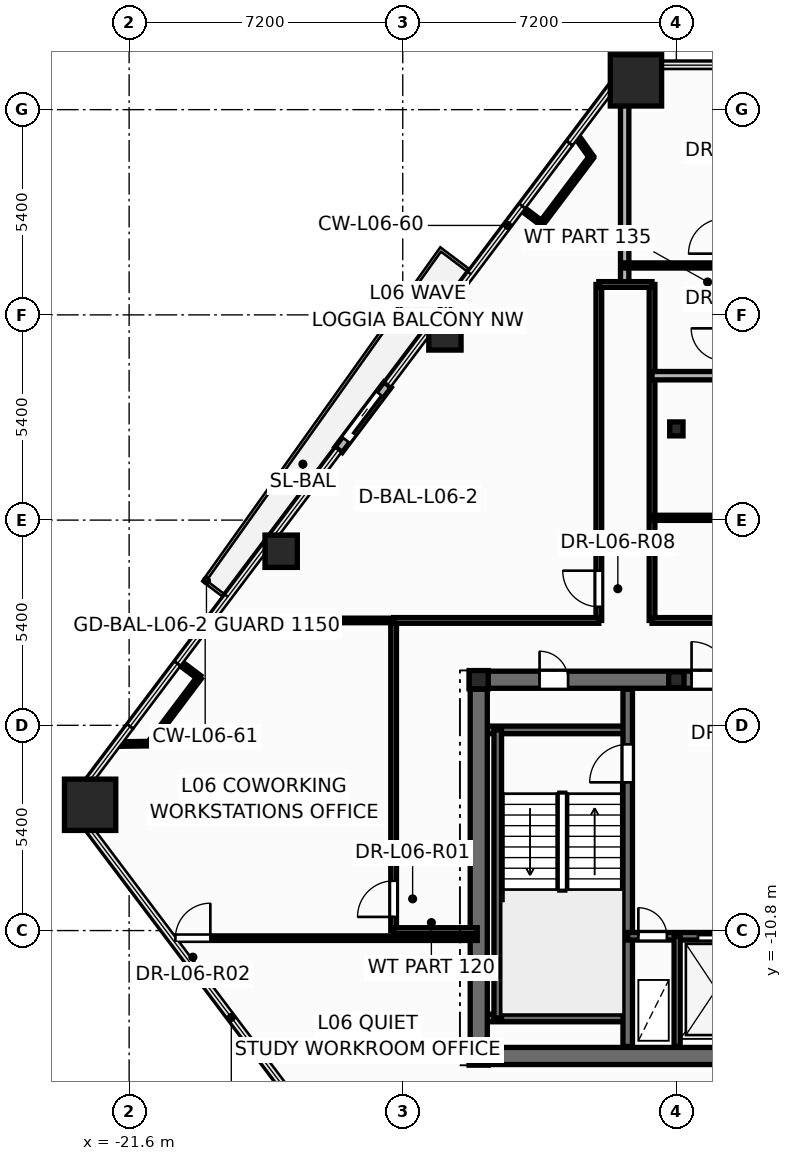
"""IFC4 building model, lengths in metres.
Left out: names, types, materials, properties, quantities, classifications, styles, units other than length and angle.
Written with IfcOpenShell. Run it as: python <this file> out.ifc"""

import sys

from ifc_helpers import new_model, si_unit, direction, frame, frame_2d, origin, origin_2d, place, context, subcontext, project, spatial, rectangle, hollow_rectangle, hollow_circle, i_section, extrude, element, fill, save


model = new_model("IFC4")
c1 = context("Model", 3, precision=1e-05, world=origin(), true_north=direction((0.0, 1.0)))
c2 = subcontext(c1, "Body", "Model", "MODEL_VIEW")
j1 = project(units=[si_unit("LENGTHUNIT", "METRE"), si_unit("PLANEANGLEUNIT", "RADIAN")], contexts=[c1])
p1 = place(None, origin())
s1 = spatial("IfcSite", under=j1, at=p1, CompositionType="ELEMENT")
p2 = place(p1, origin())
s2 = spatial("IfcBuilding", under=s1, at=p2, CompositionType="ELEMENT")
p3 = place(p2, frame((0.0, 0.0, 27.9)))
s3 = spatial("IfcBuildingStorey", under=s2, at=p3, CompositionType="ELEMENT", Elevation=27.9)
for number, where, z_axis, x_axis in (
    (1, (-22.626, -7.49, 0.0), (0.0, 0.0, 1.0), (1.0, 0.0, 0.0)),
    (2, (-8.263, 11.57, 0.0), (0.0, 0.0, 1.0), (1.0, 0.0, 0.0)),
):
    element("IfcColumn", number, at=place(p3, frame(where, z_axis=z_axis, x_axis=x_axis)), inside=s3, PredefinedType="COLUMN", context=c2, shape_type="SweptSolid", body=[
        extrude(hollow_rectangle(XDim=1.35, YDim=1.35, WallThickness=0.065, at=origin_2d()), origin(), (0.0, 0.0, 1.0), 3.6),
    ])
for number, where, z_axis, x_axis in (
    (3, (-13.29, 4.899, 0.0), (0.0, 0.0, 1.0), (1.0, 0.0, 0.0)),
    (4, (-17.599, -0.819, 0.0), (0.0, 0.0, 1.0), (1.0, 0.0, 0.0)),
):
    element("IfcColumn", number, at=place(p3, frame(where, z_axis=z_axis, x_axis=x_axis)), inside=s3, PredefinedType="COLUMN", context=c2, shape_type="SweptSolid", body=[
        extrude(hollow_circle(Radius=0.425, WallThickness=0.038, at=origin_2d()), origin(), (0.0, 0.0, 1.0), 3.6),
    ])
for number, where, z_axis, x_axis in (
    (5, (-12.4, -14.1, 0.0), (0.0, 0.0, 1.0), (1.0, 0.0, 0.0)),
    (6, (-12.4, -4.2, 0.0), (0.0, 0.0, 1.0), (1.0, 0.0, 0.0)),
):
    element("IfcColumn", number, at=place(p3, frame(where, z_axis=z_axis, x_axis=x_axis)), inside=s3, PredefinedType="COLUMN", context=c2, shape_type="SweptSolid", body=[
        extrude(i_section(OverallWidth=0.5, OverallDepth=0.482, WebThickness=0.04, FlangeThickness=0.045, at=origin_2d()), origin(), (0.0, 0.0, 1.0), 3.6),
    ])
p4 = place(p3, frame((-7.2, -4.2, 0.0), z_axis=(0.0, 0.0, 1.0), x_axis=(1.0, 0.0, 0.0)))
e7 = element("IfcColumn", 7, at=p4, inside=s3, PredefinedType="PILASTER", context=c2, shape_type="SweptSolid", body=[
    extrude(i_section(OverallWidth=0.405, OverallDepth=0.414, WebThickness=0.022, FlangeThickness=0.032, at=origin_2d()), origin(), (0.0, 0.0, 1.0), 3.6),
])
p5 = place(p3, frame((-7.2, 2.4, 0.0), z_axis=(0.0, 0.0, 1.0), x_axis=(1.0, 0.0, 0.0)))
e8 = element("IfcColumn", 8, at=p5, inside=s3, PredefinedType="COLUMN", context=c2, shape_type="SweptSolid", body=[
    extrude(i_section(OverallWidth=0.35, OverallDepth=0.367, WebThickness=0.025, FlangeThickness=0.032, at=origin_2d()), origin(), (0.0, 0.0, 1.0), 3.6),
])
p6 = place(p3, frame((-14.8, 3.561, -0.015), z_axis=(0.0, 0.0, 1.0), x_axis=(-0.601823875366, -0.798628839349, 0.0)))
e9 = element("IfcWall", 9, at=p6, inside=s3, PredefinedType="STANDARD", context=c2, shape_type="SweptSolid", body=[
    extrude(rectangle(XDim=2.14, YDim=0.24, at=frame_2d((1.07, 0.0))), origin(), (0.0, 0.0, 1.0), 2.728),
])
p7 = place(p6, frame((0.32, 0.0, 0.015)))
e10 = element("IfcOpeningElement", 10, at=p7, cuts=e9, PredefinedType="OPENING", context=c2, shape_type="SweptSolid", body=[
    extrude(rectangle(XDim=1.506, YDim=2.204, at=frame_2d((0.75, 1.102))), frame((0.0, 0.13, 0.0), z_axis=(0.0, -1.0, 0.0), x_axis=(1.0, 0.0, 0.0)), (0.0, 0.0, 1.0), 0.26),
])
p8 = place(p3, frame((-12.65, -14.1, 0.0), z_axis=(0.0, 0.0, 1.0), x_axis=(1.0, 0.0, 0.0)))
e11 = element("IfcWall", 11, at=p8, inside=s3, PredefinedType="SHEAR", context=c2, shape_type="SweptSolid", body=[
    extrude(rectangle(XDim=25.3, YDim=0.45, at=frame_2d((12.65, 0.0))), origin(), (0.0, 0.0, 1.0), 3.6),
])
p9 = place(p3, frame((-12.65, -4.2, 0.0), z_axis=(0.0, 0.0, 1.0), x_axis=(1.0, 0.0, 0.0)))
e12 = element("IfcWall", 12, at=p9, inside=s3, PredefinedType="SHEAR", context=c2, shape_type="SweptSolid", body=[
    extrude(rectangle(XDim=25.3, YDim=0.45, at=frame_2d((12.65, 0.0))), origin(), (0.0, 0.0, 1.0), 3.6),
])
p10 = place(p9, frame((1.85, 0.0, 0.0)))
e13 = element("IfcOpeningElement", 13, at=p10, cuts=e12, PredefinedType="OPENING", context=c2, shape_type="SweptSolid", body=[
    extrude(rectangle(XDim=0.756, YDim=2.054, at=frame_2d((0.375, 1.027))), frame((0.0, 0.235, 0.0), z_axis=(0.0, -1.0, 0.0), x_axis=(1.0, 0.0, 0.0)), (0.0, 0.0, 1.0), 0.47),
])
p11 = place(p9, frame((22.65, 0.0, 0.0)))
e14 = element("IfcOpeningElement", 14, at=p11, cuts=e12, PredefinedType="OPENING", context=c2, shape_type="SweptSolid", body=[
    extrude(rectangle(XDim=0.756, YDim=2.054, at=frame_2d((0.375, 1.027))), frame((0.0, 0.235, 0.0), z_axis=(0.0, -1.0, 0.0), x_axis=(1.0, 0.0, 0.0)), (0.0, 0.0, 1.0), 0.47),
])
p12 = place(p9, frame((5.85, 0.0, 0.0)))
e15 = element("IfcOpeningElement", 15, at=p12, cuts=e12, PredefinedType="OPENING", context=c2, shape_type="SweptSolid", body=[
    extrude(rectangle(XDim=1.006, YDim=2.104, at=frame_2d((0.5, 1.052))), frame((0.0, 0.235, 0.0), z_axis=(0.0, -1.0, 0.0), x_axis=(1.0, 0.0, 0.0)), (0.0, 0.0, 1.0), 0.47),
])
p13 = place(p9, frame((10.35, 0.0, 0.0)))
e16 = element("IfcOpeningElement", 16, at=p13, cuts=e12, PredefinedType="OPENING", context=c2, shape_type="SweptSolid", body=[
    extrude(rectangle(XDim=1.406, YDim=2.154, at=frame_2d((0.7, 1.077))), frame((0.0, 0.235, 0.0), z_axis=(0.0, -1.0, 0.0), x_axis=(1.0, 0.0, 0.0)), (0.0, 0.0, 1.0), 0.47),
])
p14 = place(p9, frame((18.45, 0.0, 0.0)))
e17 = element("IfcOpeningElement", 17, at=p14, cuts=e12, PredefinedType="OPENING", context=c2, shape_type="SweptSolid", body=[
    extrude(rectangle(XDim=1.006, YDim=2.104, at=frame_2d((0.5, 1.052))), frame((0.0, 0.235, 0.0), z_axis=(0.0, -1.0, 0.0), x_axis=(1.0, 0.0, 0.0)), (0.0, 0.0, 1.0), 0.47),
])
for number, where, z_axis, x_axis in (
    (18, (-12.35, -5.52, 0.0), (0.0, 0.0, 1.0), (1.0, 0.0, 0.0)),
    (19, (-12.35, -13.1, 0.0), (0.0, 0.0, 1.0), (1.0, 0.0, 0.0)),
):
    element("IfcWall", number, at=place(p3, frame(where, z_axis=z_axis, x_axis=x_axis)), inside=s3, PredefinedType="SOLIDWALL", context=c2, shape_type="SweptSolid", body=[
        extrude(rectangle(XDim=3.87, YDim=0.2, at=frame_2d((1.935, 0.0))), origin(), (0.0, 0.0, 1.0), 3.6),
    ])
p15 = place(p3, frame((-11.9, -13.1, 0.0), z_axis=(0.0, 0.0, 1.0), x_axis=(0.0, 1.0, 0.0)))
e20 = element("IfcWall", 20, at=p15, inside=s3, PredefinedType="SOLIDWALL", context=c2, shape_type="SweptSolid", body=[
    extrude(rectangle(XDim=7.58, YDim=0.2, at=frame_2d((3.79, 0.0))), origin(), (0.0, 0.0, 1.0), 3.6),
])
p16 = place(p3, frame((-8.48, -13.85, 0.0), z_axis=(0.0, 0.0, 1.0), x_axis=(0.0, 1.0, 0.0)))
e21 = element("IfcWall", 21, at=p16, inside=s3, PredefinedType="SHEAR", context=c2, shape_type="SweptSolid", body=[
    extrude(rectangle(XDim=9.4, YDim=0.25, at=frame_2d((4.7, 0.0))), origin(), (0.0, 0.0, 1.0), 3.6),
])
p17 = place(p16, frame((6.95, 0.0, 0.0)))
e22 = element("IfcOpeningElement", 22, at=p17, cuts=e21, PredefinedType="OPENING", context=c2, shape_type="SweptSolid", body=[
    extrude(rectangle(XDim=1.006, YDim=2.104, at=frame_2d((0.5, 1.052))), frame((0.0, 0.135, 0.0), z_axis=(0.0, -1.0, 0.0), x_axis=(1.0, 0.0, 0.0)), (0.0, 0.0, 1.0), 0.27),
])
p18 = place(p3, frame((-8.48, -10.95, 0.0), z_axis=(0.0, 0.0, 1.0), x_axis=(1.0, 0.0, 0.0)))
e23 = element("IfcWall", 23, at=p18, inside=s3, PredefinedType="SOLIDWALL", context=c2, shape_type="SweptSolid", body=[
    extrude(rectangle(XDim=3.36, YDim=0.2, at=frame_2d((1.68, 0.0))), origin(), (0.0, 0.0, 1.0), 3.6),
])
p19 = place(p18, frame((0.28, 0.0, 0.0)))
e24 = element("IfcOpeningElement", 24, at=p19, cuts=e23, PredefinedType="OPENING", context=c2, shape_type="SweptSolid", body=[
    extrude(rectangle(XDim=0.756, YDim=2.054, at=frame_2d((0.375, 1.027))), frame((0.0, 0.11, 0.0), z_axis=(0.0, -1.0, 0.0), x_axis=(1.0, 0.0, 0.0)), (0.0, 0.0, 1.0), 0.22),
])
p20 = place(p18, frame((1.85, 0.0, 0.0)))
e25 = element("IfcOpeningElement", 25, at=p20, cuts=e23, PredefinedType="OPENING", context=c2, shape_type="SweptSolid", body=[
    extrude(rectangle(XDim=1.106, YDim=2.104, at=frame_2d((0.55, 1.052))), frame((0.0, 0.11, 0.0), z_axis=(0.0, -1.0, 0.0), x_axis=(1.0, 0.0, 0.0)), (0.0, 0.0, 1.0), 0.22),
])
p21 = place(p3, frame((-7.18, -13.85, 0.0), z_axis=(0.0, 0.0, 1.0), x_axis=(0.0, 1.0, 0.0)))
e26 = element("IfcWall", 26, at=p21, inside=s3, PredefinedType="PARTITIONING", context=c2, shape_type="SweptSolid", body=[
    extrude(rectangle(XDim=2.9, YDim=0.16, at=frame_2d((1.45, 0.0))), origin(), (0.0, 0.0, 1.0), 2.375),
])
p22 = place(p3, frame((-12.4, -13.85, 0.0), z_axis=(0.0, 0.0, 1.0), x_axis=(0.0, 1.0, 0.0)))
e27 = element("IfcWall", 27, at=p22, inside=s3, PredefinedType="SHEAR", context=c2, shape_type="SweptSolid", body=[
    extrude(rectangle(XDim=9.4, YDim=0.45, at=frame_2d((4.7, 0.0))), origin(), (0.0, 0.0, 1.0), 3.6),
])
p23 = place(p3, frame((-9.24, -2.64, 0.0), z_axis=(0.0, 0.0, 1.0), x_axis=(0.0, 1.0, 0.0)))
e28 = element("IfcWall", 28, at=p23, inside=s3, PredefinedType="PARTITIONING", context=c2, shape_type="SweptSolid", body=[
    extrude(rectangle(XDim=8.84, YDim=0.15, at=frame_2d((4.42, 0.0))), origin(), (0.0, 0.0, 1.0), 2.509),
])
p24 = place(p23, frame((0.359, 0.0, 0.0)))
e29 = element("IfcOpeningElement", 29, at=p24, cuts=e28, PredefinedType="OPENING", context=c2, shape_type="SweptSolid", body=[
    extrude(rectangle(XDim=0.956, YDim=2.104, at=frame_2d((0.475, 1.052))), frame((0.0, 0.085, 0.0), z_axis=(0.0, -1.0, 0.0), x_axis=(1.0, 0.0, 0.0)), (0.0, 0.0, 1.0), 0.17),
])
p25 = place(p3, frame((-14.64, -10.8, 0.0), z_axis=(0.0, 0.0, 1.0), x_axis=(0.0, 1.0, 0.0)))
e30 = element("IfcWall", 30, at=p25, inside=s3, PredefinedType="PARTITIONING", context=c2, shape_type="SweptSolid", body=[
    extrude(rectangle(XDim=8.16, YDim=0.15, at=frame_2d((4.08, 0.0))), origin(), (0.0, 0.0, 1.0), 2.325),
])
p26 = place(p25, frame((0.359, 0.0, 0.0)))
e31 = element("IfcOpeningElement", 31, at=p26, cuts=e30, PredefinedType="OPENING", context=c2, shape_type="SweptSolid", body=[
    extrude(rectangle(XDim=0.956, YDim=2.104, at=frame_2d((0.475, 1.052))), frame((0.0, 0.085, 0.0), z_axis=(0.0, -1.0, 0.0), x_axis=(1.0, 0.0, 0.0)), (0.0, 0.0, 1.0), 0.17),
])
p27 = place(p3, frame((-20.483, -11.0, 0.0), z_axis=(0.0, 0.0, 1.0), x_axis=(1.0, 0.0, 0.0)))
e32 = element("IfcWall", 32, at=p27, inside=s3, PredefinedType="PARTITIONING", context=c2, shape_type="SweptSolid", body=[
    extrude(rectangle(XDim=8.043, YDim=0.12, at=frame_2d((4.021, 0.0))), origin(), (0.0, 0.0, 1.0), 2.713),
])
p28 = place(p27, frame((0.1, 0.0, 0.0)))
e33 = element("IfcOpeningElement", 33, at=p28, cuts=e32, PredefinedType="OPENING", context=c2, shape_type="SweptSolid", body=[
    extrude(rectangle(XDim=0.926, YDim=2.104, at=frame_2d((0.46, 1.052))), frame((0.0, 0.07, 0.0), z_axis=(0.0, -1.0, 0.0), x_axis=(1.0, 0.0, 0.0)), (0.0, 0.0, 1.0), 0.14),
])
p29 = place(p3, frame((-14.64, -2.64, 0.0), z_axis=(0.0, 0.0, 1.0), x_axis=(1.0, 0.0, 0.0)))
e34 = element("IfcWall", 34, at=p29, inside=s3, PredefinedType="PARTITIONING", context=c2, shape_type="SweptSolid", body=[
    extrude(rectangle(XDim=5.4, YDim=0.15, at=frame_2d((2.7, 0.0))), origin(), (0.0, 0.0, 1.0), 3.35),
])
p30 = place(p3, frame((-8.56, 6.2, 0.0), z_axis=(0.0, 0.0, 1.0), x_axis=(0.0, 1.0, 0.0)))
e35 = element("IfcWall", 35, at=p30, inside=s3, PredefinedType="PARTITIONING", context=c2, shape_type="SweptSolid", body=[
    extrude(rectangle(XDim=5.641, YDim=0.22, at=frame_2d((2.821, 0.0))), origin(), (0.0, 0.0, 1.0), 2.509),
])
p31 = place(p3, frame((-19.472, -2.64, 0.0), z_axis=(0.0, 0.0, 1.0), x_axis=(1.0, 0.0, 0.0)))
e36 = element("IfcWall", 36, at=p31, inside=s3, PredefinedType="PARTITIONING", context=c2, shape_type="SweptSolid", body=[
    extrude(rectangle(XDim=4.833, YDim=0.12, at=frame_2d((2.416, 0.0))), origin(), (0.0, 0.0, 1.0), 2.713),
])
p32 = place(p3, frame((-7.84, -2.64, 0.0), z_axis=(0.0, 0.0, 1.0), x_axis=(0.0, 1.0, 0.0)))
e37 = element("IfcWall", 37, at=p32, inside=s3, PredefinedType="PARTITIONING", context=c2, shape_type="SweptSolid", body=[
    extrude(rectangle(XDim=8.84, YDim=0.15, at=frame_2d((4.42, 0.0))), origin(), (0.0, 0.0, 1.0), 2.509),
])
p33 = place(p3, frame((-7.84, -2.64, 0.0), z_axis=(0.0, 0.0, 1.0), x_axis=(1.0, 0.0, 0.0)))
e38 = element("IfcWall", 38, at=p33, inside=s3, PredefinedType="PARTITIONING", context=c2, shape_type="SweptSolid", body=[
    extrude(rectangle(XDim=2.518, YDim=0.15, at=frame_2d((1.259, 0.0))), origin(), (0.0, 0.0, 1.0), 2.325),
])
p34 = place(p3, frame((-8.56, 6.7, 0.0), z_axis=(0.0, 0.0, 1.0), x_axis=(1.0, 0.0, 0.0)))
e39 = element("IfcWall", 39, at=p34, inside=s3, PredefinedType="PARTITIONING", context=c2, shape_type="SweptSolid", body=[
    extrude(rectangle(XDim=2.6, YDim=0.135, at=frame_2d((1.3, 0.0))), origin(), (0.0, 0.0, 1.0), 2.509),
])
p35 = place(p3, frame((-7.84, 0.06, 0.0), z_axis=(0.0, 0.0, 1.0), x_axis=(1.0, 0.0, 0.0)))
e40 = element("IfcWall", 40, at=p35, inside=s3, PredefinedType="PARTITIONING", context=c2, shape_type="SweptSolid", body=[
    extrude(rectangle(XDim=2.6, YDim=0.135, at=frame_2d((1.3, 0.0))), origin(), (0.0, 0.0, 1.0), 2.325),
])
p36 = place(p3, frame((-14.64, -10.8, 0.0), z_axis=(0.0, 0.0, 1.0), x_axis=(1.0, 0.0, 0.0)))
e41 = element("IfcWall", 41, at=p36, inside=s3, PredefinedType="PARTITIONING", context=c2, shape_type="SweptSolid", body=[
    extrude(rectangle(XDim=2.2, YDim=0.15, at=frame_2d((1.1, 0.0))), origin(), (0.0, 0.0, 1.0), 2.713),
])
p37 = place(p3, frame((-19.752, -4.14, 0.0), z_axis=(0.0, 0.0, 1.0), x_axis=(-0.601772594651, -0.798667480449, 0.0)))
e42 = element("IfcWall", 42, at=p37, inside=s3, PredefinedType="PARTITIONING", context=c2, shape_type="SweptSolid", body=[
    extrude(rectangle(XDim=2.18, YDim=0.12, at=frame_2d((1.09, 0.0))), origin(), (0.0, 0.0, 1.0), 3.35),
])
p38 = place(p3, frame((-9.434, 9.551, 0.0), z_axis=(0.0, 0.0, 1.0), x_axis=(-0.601897859726, -0.798573081475, 0.0)))
e43 = element("IfcWall", 43, at=p38, inside=s3, PredefinedType="PARTITIONING", context=c2, shape_type="SweptSolid", body=[
    extrude(rectangle(XDim=2.18, YDim=0.12, at=frame_2d((1.09, 0.0))), origin(), (0.0, 0.0, 1.0), 3.35),
])
p39 = place(p3, frame((-7.84, 3.8, 0.0), z_axis=(0.0, 0.0, 1.0), x_axis=(1.0, 0.0, 0.0)))
e44 = element("IfcWall", 44, at=p39, inside=s3, PredefinedType="PARTITIONING", context=c2, shape_type="SweptSolid", body=[
    extrude(rectangle(XDim=1.838, YDim=0.22, at=frame_2d((0.919, 0.0))), origin(), (0.0, 0.0, 1.0), 2.509),
])
p40 = place(p3, frame((-21.063, -5.881, 0.0), z_axis=(0.0, 0.0, 1.0), x_axis=(-0.999908336428, -0.013539525155, 0.0)))
e45 = element("IfcWall", 45, at=p40, inside=s3, PredefinedType="PARTITIONING", context=c2, shape_type="SweptSolid", body=[
    extrude(rectangle(XDim=0.847, YDim=0.12, at=frame_2d((0.424, 0.0))), origin(), (0.0, 0.0, 1.0), 2.713),
])
p41 = place(p3, frame((-9.24, 6.2, 0.0), z_axis=(0.0, 0.0, 1.0), x_axis=(1.0, 0.0, 0.0)))
e46 = element("IfcWall", 46, at=p41, inside=s3, PredefinedType="PARTITIONING", context=c2, shape_type="SweptSolid", body=[
    extrude(rectangle(XDim=1.4, YDim=0.15, at=frame_2d((0.7, 0.0))), origin(), (0.0, 0.0, 1.0), 3.35),
])
p42 = place(p3, frame((-9.841, 10.125, 0.0), z_axis=(0.0, 0.0, 1.0), x_axis=(0.5781810232, -0.815908514732, 0.0)))
e47 = element("IfcWall", 47, at=p42, inside=s3, PredefinedType="PARTITIONING", context=c2, shape_type="SweptSolid", body=[
    extrude(rectangle(XDim=0.703, YDim=0.12, at=frame_2d((0.352, 0.0))), origin(), (0.0, 0.0, 1.0), 2.713),
])
for number, where, z_axis, x_axis in (
    (48, (-20.287, -3.737, 0.0), (0.0, 0.0, 1.0), (0.799, -0.602, 0.0)),
    (49, (-10.746, 7.81, 0.0), (0.0, 0.0, 1.0), (-0.799, 0.602, 0.0)),
):
    element("IfcWall", number, at=place(p3, frame(where, z_axis=z_axis, x_axis=x_axis)), inside=s3, PredefinedType="PARTITIONING", context=c2, shape_type="SweptSolid", body=[
        extrude(rectangle(XDim=0.67, YDim=0.12, at=frame_2d((0.335, 0.0))), origin(), (0.0, 0.0, 1.0), 2.713),
    ])
p43 = place(p7, origin())
e50 = element("IfcDoor", 50, at=p43, inside=s3, OperationType="SLIDING_TO_RIGHT", PredefinedType="DOOR", context=c2, shape_type="SweptSolid", body=[
    extrude(rectangle(XDim=1.5, YDim=2.2, at=frame_2d((0.75, 1.1))), frame((0.0, 0.025, 0.0), z_axis=(0.0, -1.0, 0.0), x_axis=(1.0, 0.0, 0.0)), (0.0, 0.0, 1.0), 0.05),
])
fill(e10, e50)
p44 = place(p17, origin())
e51 = element("IfcDoor", 51, at=p44, inside=s3, OperationType="SINGLE_SWING_LEFT", PredefinedType="DOOR", context=c2, shape_type="SweptSolid", body=[
    extrude(rectangle(XDim=1.0, YDim=2.1, at=frame_2d((0.5, 1.05))), frame((0.0, 0.025, 0.0), z_axis=(0.0, -1.0, 0.0), x_axis=(1.0, 0.0, 0.0)), (0.0, 0.0, 1.0), 0.05),
])
fill(e22, e51)
p45 = place(p19, origin())
e52 = element("IfcDoor", 52, at=p45, inside=s3, OperationType="SINGLE_SWING_LEFT", PredefinedType="DOOR", context=c2, shape_type="SweptSolid", body=[
    extrude(rectangle(XDim=0.75, YDim=2.05, at=frame_2d((0.375, 1.025))), frame((0.0, 0.025, 0.0), z_axis=(0.0, -1.0, 0.0), x_axis=(1.0, 0.0, 0.0)), (0.0, 0.0, 1.0), 0.05),
])
fill(e24, e52)
p46 = place(p20, origin())
e53 = element("IfcDoor", 53, at=p46, inside=s3, OperationType="DOUBLE_DOOR_SLIDING", PredefinedType="DOOR", context=c2, shape_type="SweptSolid", body=[
    extrude(rectangle(XDim=1.1, YDim=2.1, at=frame_2d((0.55, 1.05))), frame((0.0, 0.025, 0.0), z_axis=(0.0, -1.0, 0.0), x_axis=(1.0, 0.0, 0.0)), (0.0, 0.0, 1.0), 0.05),
])
fill(e25, e53)
p47 = place(p10, origin())
e54 = element("IfcDoor", 54, at=p47, inside=s3, OperationType="SINGLE_SWING_LEFT", PredefinedType="DOOR", context=c2, shape_type="SweptSolid", body=[
    extrude(rectangle(XDim=0.75, YDim=2.05, at=frame_2d((0.375, 1.025))), frame((0.0, 0.025, 0.0), z_axis=(0.0, -1.0, 0.0), x_axis=(1.0, 0.0, 0.0)), (0.0, 0.0, 1.0), 0.05),
])
fill(e13, e54)
p48 = place(p12, origin())
e55 = element("IfcDoor", 55, at=p48, inside=s3, OperationType="SINGLE_SWING_LEFT", PredefinedType="DOOR", context=c2, shape_type="SweptSolid", body=[
    extrude(rectangle(XDim=1.0, YDim=2.1, at=frame_2d((0.5, 1.05))), frame((0.0, 0.025, 0.0), z_axis=(0.0, -1.0, 0.0), x_axis=(1.0, 0.0, 0.0)), (0.0, 0.0, 1.0), 0.05),
])
fill(e15, e55)
p49 = place(p26, origin())
e56 = element("IfcDoor", 56, at=p49, inside=s3, OperationType="SINGLE_SWING_LEFT", PredefinedType="DOOR", context=c2, shape_type="SweptSolid", body=[
    extrude(rectangle(XDim=0.95, YDim=2.1, at=frame_2d((0.475, 1.05))), frame((0.0, 0.025, 0.0), z_axis=(0.0, -1.0, 0.0), x_axis=(1.0, 0.0, 0.0)), (0.0, 0.0, 1.0), 0.05),
])
fill(e31, e56)
p50 = place(p28, origin())
e57 = element("IfcDoor", 57, at=p50, inside=s3, OperationType="SINGLE_SWING_RIGHT", PredefinedType="DOOR", context=c2, shape_type="SweptSolid", body=[
    extrude(rectangle(XDim=0.92, YDim=2.1, at=frame_2d((0.46, 1.05))), frame((0.0, 0.025, 0.0), z_axis=(0.0, -1.0, 0.0), x_axis=(1.0, 0.0, 0.0)), (0.0, 0.0, 1.0), 0.05),
])
fill(e33, e57)
p51 = place(p24, origin())
e58 = element("IfcDoor", 58, at=p51, inside=s3, OperationType="SINGLE_SWING_RIGHT", PredefinedType="DOOR", context=c2, shape_type="SweptSolid", body=[
    extrude(rectangle(XDim=0.95, YDim=2.1, at=frame_2d((0.475, 1.05))), frame((0.0, 0.025, 0.0), z_axis=(0.0, -1.0, 0.0), x_axis=(1.0, 0.0, 0.0)), (0.0, 0.0, 1.0), 0.05),
])
fill(e29, e58)
save(model, sys.argv[1])
